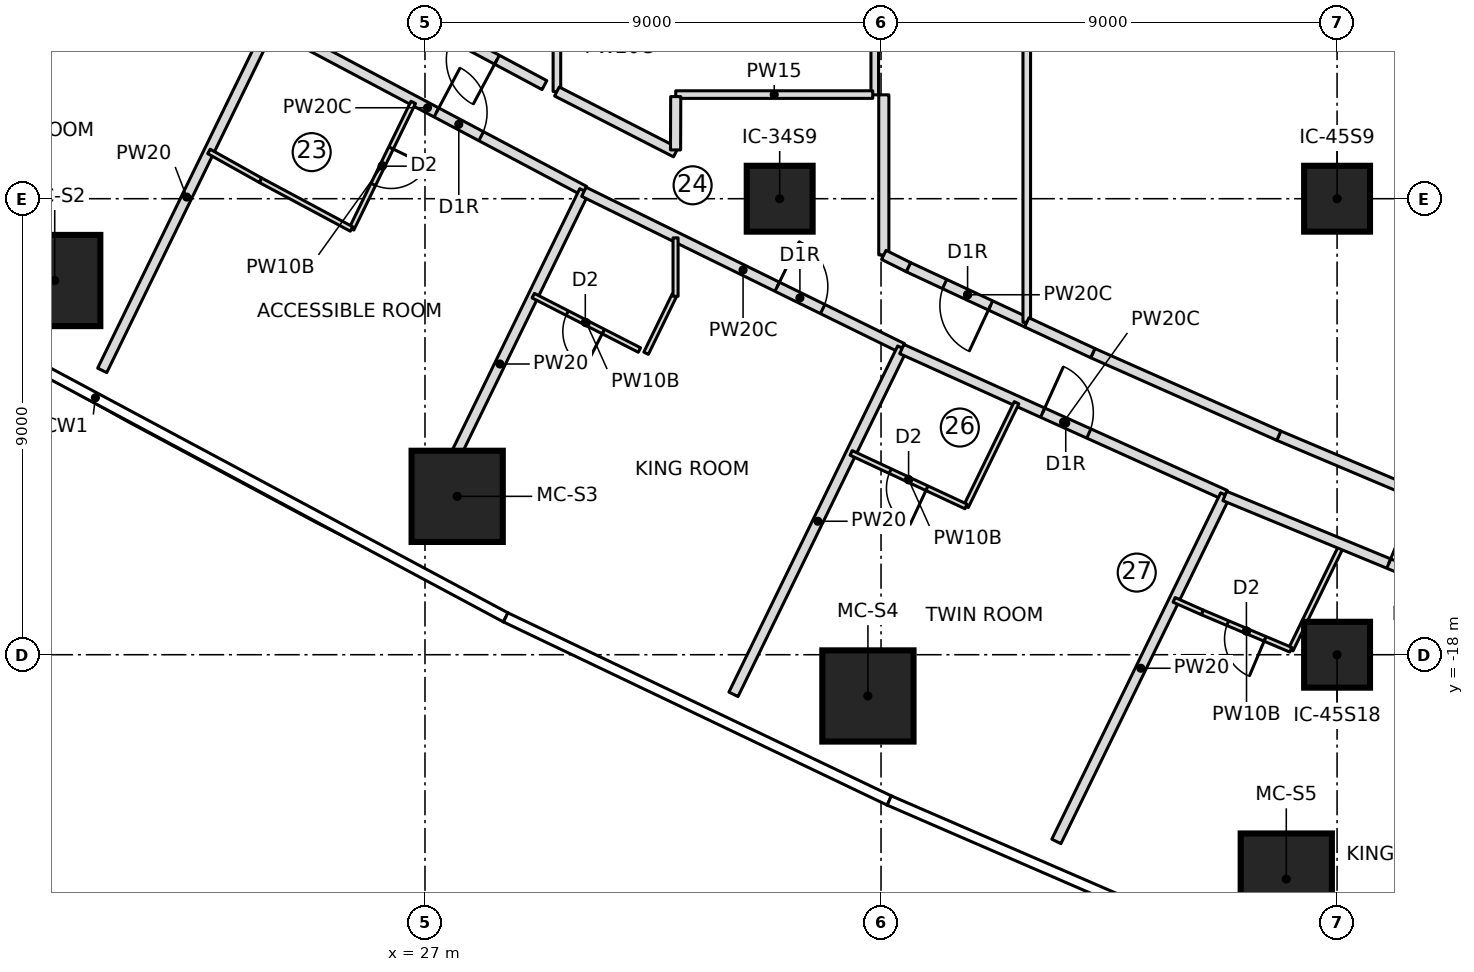
"""IFC4 building model, lengths in metres.
Left out: names, types, materials, properties, quantities, classifications, styles, units other than length and angle.
Written with IfcOpenShell. Run it as: python <this file> out.ifc"""

import sys

from ifc_helpers import new_model, si_unit, direction, frame, frame_2d, origin, origin_2d, place, context, subcontext, project, spatial, rectangle, extrude, element, fill, save


model = new_model("IFC4")
c1 = context("Model", 3, precision=1e-05, world=origin(), true_north=direction((0.0, 1.0)))
c2 = subcontext(c1, "Body", "Model", "MODEL_VIEW")
j1 = project(units=[si_unit("LENGTHUNIT", "METRE"), si_unit("PLANEANGLEUNIT", "RADIAN")], contexts=[c1])
p1 = place(None, origin())
s1 = spatial("IfcSite", under=j1, at=p1, CompositionType="ELEMENT")
p2 = place(p1, origin())
s2 = spatial("IfcBuilding", under=s1, at=p2, CompositionType="ELEMENT")
p3 = place(p2, frame((0.0, 0.0, 68.0)))
s3 = spatial("IfcBuildingStorey", under=s2, at=p3, CompositionType="ELEMENT", Elevation=68.0)
for number, where, z_axis, x_axis in (
    (1, (19.693, -10.615, 0.0), (0.0, 0.0, 1.0), (1.0, 0.0, 0.0)),
    (2, (27.635, -14.874, 0.0), (0.0, 0.0, 1.0), (1.0, 0.0, 0.0)),
    (3, (35.741, -18.814, 0.0), (0.0, 0.0, 1.0), (1.0, 0.0, 0.0)),
    (4, (43.998, -22.428, 0.0), (0.0, 0.0, 1.0), (1.0, 0.0, 0.0)),
):
    element("IfcColumn", number, at=place(p3, frame(where, z_axis=z_axis, x_axis=x_axis)), inside=s3, PredefinedType="COLUMN", context=c2, shape_type="SweptSolid", body=[
        extrude(rectangle(XDim=1.8, YDim=1.8, at=origin_2d()), origin(), (0.0, 0.0, 1.0), 3.55),
    ])
for number, where, z_axis, x_axis in (
    (5, (34.0, -9.0, 0.0), (0.0, 0.0, 1.0), (1.0, 0.0, 0.0)),
    (6, (45.0, -18.0, 0.0), (0.0, 0.0, 1.0), (1.0, 0.0, 0.0)),
    (7, (45.0, -9.0, 0.0), (0.0, 0.0, 1.0), (1.0, 0.0, 0.0)),
):
    element("IfcColumn", number, at=place(p3, frame(where, z_axis=z_axis, x_axis=x_axis)), inside=s3, PredefinedType="COLUMN", context=c2, shape_type="SweptSolid", body=[
        extrude(rectangle(XDim=1.3, YDim=1.3, at=origin_2d()), origin(), (0.0, 0.0, 1.0), 3.55),
    ])
p4 = place(p3, frame((20.63, -12.388, 0.0), z_axis=(0.0, 0.0, 1.0), x_axis=(0.438184754816, 0.898884931816, 0.0)))
e8 = element("IfcWall", 8, at=p4, inside=s3, PredefinedType="PARTITIONING", context=c2, shape_type="SweptSolid", body=[
    extrude(rectangle(XDim=7.612, YDim=0.2, at=frame_2d((3.806, 0.0))), origin(), (0.0, 0.0, 1.0), 3.25),
])
p5 = place(p3, frame((23.957, -5.564, 0.0), z_axis=(0.0, 0.0, 1.0), x_axis=(0.883455325405, -0.468515408513, 0.0)))
e9 = element("IfcWall", 9, at=p5, inside=s3, PredefinedType="PARTITIONING", context=c2, shape_type="SweptSolid", body=[
    extrude(rectangle(XDim=7.004, YDim=0.2, at=frame_2d((3.502, 0.0))), origin(), (0.0, 0.0, 1.0), 3.25),
])
p6 = place(p5, frame((3.7, 0.0, 0.0)))
e10 = element("IfcOpeningElement", 10, at=p6, cuts=e9, PredefinedType="OPENING", context=c2, shape_type="SweptSolid", body=[
    extrude(rectangle(XDim=1.0, YDim=2.1, at=frame_2d((0.5, 1.05))), frame((0.0, 0.11, 0.0), z_axis=(0.0, -1.0, 0.0), x_axis=(1.0, 0.0, 0.0)), (0.0, 0.0, 1.0), 0.22),
])
p7 = place(p3, frame((26.768, -7.1, 0.0), z_axis=(0.0, 0.0, 1.0), x_axis=(-0.43822975423, -0.898862994292, 0.0)))
e11 = element("IfcWall", 11, at=p7, inside=s3, PredefinedType="PARTITIONING", context=c2, shape_type="SweptSolid", body=[
    extrude(rectangle(XDim=2.779, YDim=0.1, at=frame_2d((1.389, 0.0))), origin(), (0.0, 0.0, 1.0), 3.25),
])
p8 = place(p7, frame((1.0, 0.0, 0.0)))
e12 = element("IfcOpeningElement", 12, at=p8, cuts=e11, PredefinedType="OPENING", context=c2, shape_type="SweptSolid", body=[
    extrude(rectangle(XDim=0.8, YDim=2.1, at=frame_2d((0.4, 1.05))), frame((0.0, 0.06, 0.0), z_axis=(0.0, -1.0, 0.0), x_axis=(1.0, 0.0, 0.0)), (0.0, 0.0, 1.0), 0.12),
])
p9 = place(p3, frame((25.55, -9.597, 0.0), z_axis=(0.0, 0.0, 1.0), x_axis=(-0.881675736231, 0.471855800156, 0.0)))
e13 = element("IfcWall", 13, at=p9, inside=s3, PredefinedType="PARTITIONING", context=c2, shape_type="SweptSolid", body=[
    extrude(rectangle(XDim=2.039, YDim=0.1, at=frame_2d((1.019, 0.0))), origin(), (0.0, 0.0, 1.0), 3.25),
])
p10 = place(p3, frame((23.753, -8.635, 0.0), z_axis=(0.0, 0.0, 1.0), x_axis=(-0.872799020153, 0.488079778745, 0.0)))
e14 = element("IfcWall", 14, at=p10, inside=s3, PredefinedType="PARTITIONING", context=c2, shape_type="SweptSolid", body=[
    extrude(rectangle(XDim=1.165, YDim=0.1, at=frame_2d((0.582, 0.0))), origin(), (0.0, 0.0, 1.0), 3.25),
])
p11 = place(p3, frame((26.813, -15.678, 0.0), z_axis=(0.0, 0.0, 1.0), x_axis=(0.438185054829, 0.898884785567, 0.0)))
e15 = element("IfcWall", 15, at=p11, inside=s3, PredefinedType="PARTITIONING", context=c2, shape_type="SweptSolid", body=[
    extrude(rectangle(XDim=7.601, YDim=0.2, at=frame_2d((3.801, 0.0))), origin(), (0.0, 0.0, 1.0), 3.25),
])
p12 = place(p3, frame((30.135, -8.864, 0.0), z_axis=(0.0, 0.0, 1.0), x_axis=(0.897599118183, -0.44081268475, 0.0)))
e16 = element("IfcWall", 16, at=p12, inside=s3, PredefinedType="PARTITIONING", context=c2, shape_type="SweptSolid", body=[
    extrude(rectangle(XDim=7.0, YDim=0.2, at=frame_2d((3.5, 0.0))), origin(), (0.0, 0.0, 1.0), 3.25),
])
p13 = place(p12, frame((4.25, 0.0, 0.0)))
e17 = element("IfcOpeningElement", 17, at=p13, cuts=e16, PredefinedType="OPENING", context=c2, shape_type="SweptSolid", body=[
    extrude(rectangle(XDim=1.0, YDim=2.1, at=frame_2d((0.5, 1.05))), frame((0.0, 0.11, 0.0), z_axis=(0.0, -1.0, 0.0), x_axis=(1.0, 0.0, 0.0)), (0.0, 0.0, 1.0), 0.22),
])
p14 = place(p3, frame((31.925, -10.898, 0.0), z_axis=(0.0, 0.0, 1.0), x_axis=(-0.438356099343, -0.898801385273, 0.0)))
e18 = element("IfcWall", 18, at=p14, inside=s3, PredefinedType="PARTITIONING", context=c2, shape_type="SweptSolid", body=[
    extrude(rectangle(XDim=1.282, YDim=0.1, at=frame_2d((0.641, 0.0))), origin(), (0.0, 0.0, 1.0), 3.25),
])
p15 = place(p3, frame((31.232, -11.986, 0.0), z_axis=(0.0, 0.0, 1.0), x_axis=(-0.890219804082, 0.45553122881, 0.0)))
e19 = element("IfcWall", 19, at=p15, inside=s3, PredefinedType="PARTITIONING", context=c2, shape_type="SweptSolid", body=[
    extrude(rectangle(XDim=2.354, YDim=0.1, at=frame_2d((1.177, 0.0))), origin(), (0.0, 0.0, 1.0), 3.25),
])
p16 = place(p15, frame((0.8, 0.0, 0.0)))
e20 = element("IfcOpeningElement", 20, at=p16, cuts=e19, PredefinedType="OPENING", context=c2, shape_type="SweptSolid", body=[
    extrude(rectangle(XDim=0.8, YDim=2.1, at=frame_2d((0.4, 1.05))), frame((0.0, 0.06, 0.0), z_axis=(0.0, -1.0, 0.0), x_axis=(1.0, 0.0, 0.0)), (0.0, 0.0, 1.0), 0.12),
])
p17 = place(p3, frame((33.088, -18.782, 0.0), z_axis=(0.0, 0.0, 1.0), x_axis=(0.438197705697, 0.898878618459, 0.0)))
e21 = element("IfcWall", 21, at=p17, inside=s3, PredefinedType="PARTITIONING", context=c2, shape_type="SweptSolid", body=[
    extrude(rectangle(XDim=7.601, YDim=0.2, at=frame_2d((3.801, 0.0))), origin(), (0.0, 0.0, 1.0), 3.25),
])
p18 = place(p3, frame((36.41, -11.968, 0.0), z_axis=(0.0, 0.0, 1.0), x_axis=(0.911422478094, -0.411471829443, 0.0)))
e22 = element("IfcWall", 22, at=p18, inside=s3, PredefinedType="PARTITIONING", context=c2, shape_type="SweptSolid", body=[
    extrude(rectangle(XDim=7.003, YDim=0.2, at=frame_2d((3.501, 0.0))), origin(), (0.0, 0.0, 1.0), 3.25),
])
p19 = place(p18, frame((3.05, 0.0, 0.0)))
e23 = element("IfcOpeningElement", 23, at=p19, cuts=e22, PredefinedType="OPENING", context=c2, shape_type="SweptSolid", body=[
    extrude(rectangle(XDim=1.0, YDim=2.1, at=frame_2d((0.5, 1.05))), frame((0.0, 0.11, 0.0), z_axis=(0.0, -1.0, 0.0), x_axis=(1.0, 0.0, 0.0)), (0.0, 0.0, 1.0), 0.22),
])
p20 = place(p3, frame((38.675, -13.027, 0.0), z_axis=(0.0, 0.0, 1.0), x_axis=(-0.43818492173, -0.89888485045, 0.0)))
e24 = element("IfcWall", 24, at=p20, inside=s3, PredefinedType="PARTITIONING", context=c2, shape_type="SweptSolid", body=[
    extrude(rectangle(XDim=2.277, YDim=0.1, at=frame_2d((1.139, 0.0))), origin(), (0.0, 0.0, 1.0), 3.25),
])
p21 = place(p3, frame((37.677, -15.074, 0.0), z_axis=(0.0, 0.0, 1.0), x_axis=(-0.906317797926, 0.422596792655, 0.0)))
e25 = element("IfcWall", 25, at=p21, inside=s3, PredefinedType="PARTITIONING", context=c2, shape_type="SweptSolid", body=[
    extrude(rectangle(XDim=2.5, YDim=0.1, at=frame_2d((1.25, 0.0))), origin(), (0.0, 0.0, 1.0), 3.25),
])
p22 = place(p21, frame((0.85, 0.0, 0.0)))
e26 = element("IfcOpeningElement", 26, at=p22, cuts=e25, PredefinedType="OPENING", context=c2, shape_type="SweptSolid", body=[
    extrude(rectangle(XDim=0.8, YDim=2.1, at=frame_2d((0.4, 1.05))), frame((0.0, 0.06, 0.0), z_axis=(0.0, -1.0, 0.0), x_axis=(1.0, 0.0, 0.0)), (0.0, 0.0, 1.0), 0.12),
])
p23 = place(p3, frame((39.46, -21.685, 0.0), z_axis=(0.0, 0.0, 1.0), x_axis=(0.438214892445, 0.898870239823, 0.0)))
e27 = element("IfcWall", 27, at=p23, inside=s3, PredefinedType="PARTITIONING", context=c2, shape_type="SweptSolid", body=[
    extrude(rectangle(XDim=7.605, YDim=0.2, at=frame_2d((3.802, 0.0))), origin(), (0.0, 0.0, 1.0), 3.25),
])
p24 = place(p3, frame((45.085, -15.852, 0.0), z_axis=(0.0, 0.0, 1.0), x_axis=(-0.438227394636, -0.89886414468, 0.0)))
e28 = element("IfcWall", 28, at=p24, inside=s3, PredefinedType="PARTITIONING", context=c2, shape_type="SweptSolid", body=[
    extrude(rectangle(XDim=1.667, YDim=0.1, at=frame_2d((0.833, 0.0))), origin(), (0.0, 0.0, 1.0), 3.25),
])
p25 = place(p3, frame((44.35, -17.36, 0.0), z_axis=(0.0, 0.0, 1.0), x_axis=(-0.438279975423, -0.898838507822, 0.0)))
e29 = element("IfcWall", 29, at=p25, inside=s3, PredefinedType="PARTITIONING", context=c2, shape_type="SweptSolid", body=[
    extrude(rectangle(XDim=0.603, YDim=0.1, at=frame_2d((0.301, 0.0))), origin(), (0.0, 0.0, 1.0), 3.25),
])
p26 = place(p3, frame((44.086, -17.902, 0.0), z_axis=(0.0, 0.0, 1.0), x_axis=(-0.921263923232, 0.38893802045, 0.0)))
e30 = element("IfcWall", 30, at=p26, inside=s3, PredefinedType="PARTITIONING", context=c2, shape_type="SweptSolid", body=[
    extrude(rectangle(XDim=1.895, YDim=0.1, at=frame_2d((0.948, 0.0))), origin(), (0.0, 0.0, 1.0), 3.25),
])
p27 = place(p26, frame((0.55, 0.0, 0.0)))
e31 = element("IfcOpeningElement", 31, at=p27, cuts=e30, PredefinedType="OPENING", context=c2, shape_type="SweptSolid", body=[
    extrude(rectangle(XDim=0.8, YDim=2.1, at=frame_2d((0.4, 1.05))), frame((0.0, 0.06, 0.0), z_axis=(0.0, -1.0, 0.0), x_axis=(1.0, 0.0, 0.0)), (0.0, 0.0, 1.0), 0.12),
])
p28 = place(p3, frame((42.34, -17.165, 0.0), z_axis=(0.0, 0.0, 1.0), x_axis=(-0.913894320415, 0.405952178357, 0.0)))
e32 = element("IfcWall", 32, at=p28, inside=s3, PredefinedType="PARTITIONING", context=c2, shape_type="SweptSolid", body=[
    extrude(rectangle(XDim=0.608, YDim=0.1, at=frame_2d((0.304, 0.0))), origin(), (0.0, 0.0, 1.0), 3.25),
])
p29 = place(p3, frame((29.357, -6.758, 0.0), z_axis=(0.0, 0.0, 1.0), x_axis=(-0.881637943627, 0.471926409895, 0.0)))
e33 = element("IfcWall", 33, at=p29, inside=s3, PredefinedType="PARTITIONING", context=c2, shape_type="SweptSolid", body=[
    extrude(rectangle(XDim=3.124, YDim=0.2, at=frame_2d((1.562, 0.0))), origin(), (0.0, 0.0, 1.0), 3.25),
])
p30 = place(p29, frame((1.062, 0.0, 0.0)))
e34 = element("IfcOpeningElement", 34, at=p30, cuts=e33, PredefinedType="OPENING", context=c2, shape_type="SweptSolid", body=[
    extrude(rectangle(XDim=1.0, YDim=2.1, at=frame_2d((0.5, 1.05))), frame((0.0, 0.11, 0.0), z_axis=(0.0, -1.0, 0.0), x_axis=(1.0, 0.0, 0.0)), (0.0, 0.0, 1.0), 0.22),
])
p31 = place(p3, frame((29.604, -6.884, 0.0), z_axis=(0.0, 0.0, 1.0), x_axis=(0.0, 1.0, 0.0)))
e35 = element("IfcWall", 35, at=p31, inside=s3, PredefinedType="PARTITIONING", context=c2, shape_type="SweptSolid", body=[
    extrude(rectangle(XDim=13.768, YDim=0.15, at=frame_2d((6.884, 0.0))), origin(), (0.0, 0.0, 1.0), 3.25),
])
p32 = place(p3, frame((31.95, -8.085, 0.0), z_axis=(0.0, 0.0, 1.0), x_axis=(-0.890220210981, 0.455530433628, 0.0)))
e36 = element("IfcWall", 36, at=p32, inside=s3, PredefinedType="PARTITIONING", context=c2, shape_type="SweptSolid", body=[
    extrude(rectangle(XDim=2.636, YDim=0.2, at=frame_2d((1.318, 0.0))), origin(), (0.0, 0.0, 1.0), 3.25),
])
p33 = place(p3, frame((35.876, -6.95, 0.0), z_axis=(0.0, 0.0, 1.0), x_axis=(0.0, 1.0, 0.0)))
e37 = element("IfcWall", 37, at=p33, inside=s3, PredefinedType="PARTITIONING", context=c2, shape_type="SweptSolid", body=[
    extrude(rectangle(XDim=13.9, YDim=0.15, at=frame_2d((6.95, 0.0))), origin(), (0.0, 0.0, 1.0), 3.25),
])
p34 = place(p3, frame((38.876, -11.44, 0.0), z_axis=(0.0, 0.0, 1.0), x_axis=(-0.906347616376, 0.422532836937, 0.0)))
e38 = element("IfcWall", 38, at=p34, inside=s3, PredefinedType="PARTITIONING", context=c2, shape_type="SweptSolid", body=[
    extrude(rectangle(XDim=2.578, YDim=0.2, at=frame_2d((1.289, 0.0))), origin(), (0.0, 0.0, 1.0), 3.25),
])
p35 = place(p34, frame((0.789, 0.0, 0.0)))
e39 = element("IfcOpeningElement", 39, at=p35, cuts=e38, PredefinedType="OPENING", context=c2, shape_type="SweptSolid", body=[
    extrude(rectangle(XDim=1.0, YDim=2.1, at=frame_2d((0.5, 1.05))), frame((0.0, 0.11, 0.0), z_axis=(0.0, -1.0, 0.0), x_axis=(1.0, 0.0, 0.0)), (0.0, 0.0, 1.0), 0.22),
])
p36 = place(p3, frame((38.876, -11.44, 0.0), z_axis=(0.0, 0.0, 1.0), x_axis=(0.0, 1.0, 0.0)))
e40 = element("IfcWall", 40, at=p36, inside=s3, PredefinedType="PARTITIONING", context=c2, shape_type="SweptSolid", body=[
    extrude(rectangle(XDim=22.88, YDim=0.15, at=frame_2d((11.44, 0.0))), origin(), (0.0, 0.0, 1.0), 3.25),
])
p37 = place(p3, frame((47.55, -15.239, 0.0), z_axis=(0.0, 0.0, 1.0), x_axis=(-0.921269894054, 0.388923877269, 0.0)))
e41 = element("IfcWall", 41, at=p37, inside=s3, PredefinedType="PARTITIONING", context=c2, shape_type="SweptSolid", body=[
    extrude(rectangle(XDim=4.016, YDim=0.2, at=frame_2d((2.008, 0.0))), origin(), (0.0, 0.0, 1.0), 3.25),
])
p38 = place(p3, frame((43.85, -13.677, 0.0), z_axis=(0.0, 0.0, 1.0), x_axis=(-0.913986953061, 0.405743576209, 0.0)))
e42 = element("IfcWall", 42, at=p38, inside=s3, PredefinedType="PARTITIONING", context=c2, shape_type="SweptSolid", body=[
    extrude(rectangle(XDim=4.016, YDim=0.2, at=frame_2d((2.008, 0.0))), origin(), (0.0, 0.0, 1.0), 3.25),
])
p39 = place(p3, frame((40.18, -12.048, 0.0), z_axis=(0.0, 0.0, 1.0), x_axis=(-0.906347874546, 0.422532283152, 0.0)))
e43 = element("IfcWall", 43, at=p39, inside=s3, PredefinedType="PARTITIONING", context=c2, shape_type="SweptSolid", body=[
    extrude(rectangle(XDim=1.438, YDim=0.2, at=frame_2d((0.719, 0.0))), origin(), (0.0, 0.0, 1.0), 3.25),
])
p40 = place(p3, frame((31.945, -9.773, 0.0), z_axis=(0.0, 0.0, 1.0), x_axis=(0.0, -1.0, 0.0)))
e44 = element("IfcWall", 44, at=p40, inside=s3, PredefinedType="PARTITIONING", context=c2, shape_type="SweptSolid", body=[
    extrude(rectangle(XDim=1.153, YDim=0.1, at=frame_2d((0.576, 0.0))), origin(), (0.0, 0.0, 1.0), 3.25),
])
p41 = place(p3, frame((42.784, -14.867, 0.0), z_axis=(0.0, 0.0, 1.0), x_axis=(0.92451459323, -0.381146647507, 0.0)))
e45 = element("IfcWall", 45, at=p41, inside=s3, PredefinedType="PARTITIONING", context=c2, shape_type="SweptSolid", body=[
    extrude(rectangle(XDim=5.322, YDim=0.2, at=frame_2d((2.661, 0.0))), origin(), (0.0, 0.0, 1.0), 3.25),
])
p42 = place(p41, frame((3.5, 0.0, 0.0)))
e46 = element("IfcOpeningElement", 46, at=p42, cuts=e45, PredefinedType="OPENING", context=c2, shape_type="SweptSolid", body=[
    extrude(rectangle(XDim=1.0, YDim=2.1, at=frame_2d((0.5, 1.05))), frame((0.0, 0.11, 0.0), z_axis=(0.0, -1.0, 0.0), x_axis=(1.0, 0.0, 0.0)), (0.0, 0.0, 1.0), 0.22),
])
p43 = place(p3, frame((35.836, -6.945, 0.0), z_axis=(0.0, 0.0, 1.0), x_axis=(-0.999999998028, -6.2798292e-05, 0.0)))
e47 = element("IfcWall", 47, at=p43, inside=s3, PredefinedType="PARTITIONING", context=c2, shape_type="SweptSolid", body=[
    extrude(rectangle(XDim=3.888, YDim=0.15, at=frame_2d((1.944, 0.0))), origin(), (0.0, 0.0, 1.0), 3.25),
])
p44 = place(p3, frame((31.948, -6.985, 0.0), z_axis=(0.0, 0.0, 1.0), x_axis=(-0.003248242724, -0.999994724446, 0.0)))
e48 = element("IfcWall", 48, at=p44, inside=s3, PredefinedType="PARTITIONING", context=c2, shape_type="SweptSolid", body=[
    extrude(rectangle(XDim=1.052, YDim=0.2, at=frame_2d((0.526, 0.0))), origin(), (0.0, 0.0, 1.0), 3.25),
])
p45 = place(p3, frame((36.055, -10.108, 0.0), z_axis=(0.0, 0.0, 1.0), x_axis=(0.0, 1.0, 0.0)))
e49 = element("IfcWall", 49, at=p45, inside=s3, PredefinedType="PARTITIONING", context=c2, shape_type="SweptSolid", body=[
    extrude(rectangle(XDim=3.158, YDim=0.2, at=frame_2d((1.579, 0.0))), origin(), (0.0, 0.0, 1.0), 3.25),
])
p46 = place(p3, frame((36.54, -10.351, 0.0), z_axis=(0.0, 0.0, 1.0), x_axis=(-0.894337154042, 0.447393624116, 0.0)))
e50 = element("IfcWall", 50, at=p46, inside=s3, PredefinedType="PARTITIONING", context=c2, shape_type="SweptSolid", body=[
    extrude(rectangle(XDim=0.542, YDim=0.2, at=frame_2d((0.271, 0.0))), origin(), (0.0, 0.0, 1.0), 3.25),
])
p47 = place(p8, origin())
e51 = element("IfcDoor", 51, at=p47, inside=s3, OperationType="SINGLE_SWING_LEFT", PredefinedType="DOOR", context=c2, shape_type="SweptSolid", body=[
    extrude(rectangle(XDim=0.8, YDim=2.1, at=frame_2d((0.4, 1.05))), frame((0.0, 0.025, 0.0), z_axis=(0.0, -1.0, 0.0), x_axis=(1.0, 0.0, 0.0)), (0.0, 0.0, 1.0), 0.05),
])
fill(e12, e51)
p48 = place(p6, origin())
e52 = element("IfcDoor", 52, at=p48, inside=s3, OperationType="SINGLE_SWING_RIGHT", PredefinedType="DOOR", context=c2, shape_type="SweptSolid", body=[
    extrude(rectangle(XDim=1.0, YDim=2.1, at=frame_2d((0.5, 1.05))), frame((0.0, 0.025, 0.0), z_axis=(0.0, -1.0, 0.0), x_axis=(1.0, 0.0, 0.0)), (0.0, 0.0, 1.0), 0.05),
])
fill(e10, e52)
p49 = place(p16, origin())
e53 = element("IfcDoor", 53, at=p49, inside=s3, OperationType="SINGLE_SWING_LEFT", PredefinedType="DOOR", context=c2, shape_type="SweptSolid", body=[
    extrude(rectangle(XDim=0.8, YDim=2.1, at=frame_2d((0.4, 1.05))), frame((0.0, 0.025, 0.0), z_axis=(0.0, -1.0, 0.0), x_axis=(1.0, 0.0, 0.0)), (0.0, 0.0, 1.0), 0.05),
])
fill(e20, e53)
p50 = place(p13, origin())
e54 = element("IfcDoor", 54, at=p50, inside=s3, OperationType="SINGLE_SWING_RIGHT", PredefinedType="DOOR", context=c2, shape_type="SweptSolid", body=[
    extrude(rectangle(XDim=1.0, YDim=2.1, at=frame_2d((0.5, 1.05))), frame((0.0, 0.025, 0.0), z_axis=(0.0, -1.0, 0.0), x_axis=(1.0, 0.0, 0.0)), (0.0, 0.0, 1.0), 0.05),
])
fill(e17, e54)
p51 = place(p22, origin())
e55 = element("IfcDoor", 55, at=p51, inside=s3, OperationType="SINGLE_SWING_LEFT", PredefinedType="DOOR", context=c2, shape_type="SweptSolid", body=[
    extrude(rectangle(XDim=0.8, YDim=2.1, at=frame_2d((0.4, 1.05))), frame((0.0, 0.025, 0.0), z_axis=(0.0, -1.0, 0.0), x_axis=(1.0, 0.0, 0.0)), (0.0, 0.0, 1.0), 0.05),
])
fill(e26, e55)
p52 = place(p19, origin())
e56 = element("IfcDoor", 56, at=p52, inside=s3, OperationType="SINGLE_SWING_RIGHT", PredefinedType="DOOR", context=c2, shape_type="SweptSolid", body=[
    extrude(rectangle(XDim=1.0, YDim=2.1, at=frame_2d((0.5, 1.05))), frame((0.0, 0.025, 0.0), z_axis=(0.0, -1.0, 0.0), x_axis=(1.0, 0.0, 0.0)), (0.0, 0.0, 1.0), 0.05),
])
fill(e23, e56)
p53 = place(p27, origin())
e57 = element("IfcDoor", 57, at=p53, inside=s3, OperationType="SINGLE_SWING_LEFT", PredefinedType="DOOR", context=c2, shape_type="SweptSolid", body=[
    extrude(rectangle(XDim=0.8, YDim=2.1, at=frame_2d((0.4, 1.05))), frame((0.0, 0.025, 0.0), z_axis=(0.0, -1.0, 0.0), x_axis=(1.0, 0.0, 0.0)), (0.0, 0.0, 1.0), 0.05),
])
fill(e31, e57)
p54 = place(p42, origin())
e58 = element("IfcDoor", 58, at=p54, inside=s3, OperationType="SINGLE_SWING_RIGHT", PredefinedType="DOOR", context=c2, shape_type="SweptSolid", body=[
    extrude(rectangle(XDim=1.0, YDim=2.1, at=frame_2d((0.5, 1.05))), frame((0.0, 0.025, 0.0), z_axis=(0.0, -1.0, 0.0), x_axis=(1.0, 0.0, 0.0)), (0.0, 0.0, 1.0), 0.05),
])
fill(e46, e58)
p55 = place(p30, origin())
e59 = element("IfcDoor", 59, at=p55, inside=s3, OperationType="SINGLE_SWING_RIGHT", PredefinedType="DOOR", context=c2, shape_type="SweptSolid", body=[
    extrude(rectangle(XDim=1.0, YDim=2.1, at=frame_2d((0.5, 1.05))), frame((0.0, 0.025, 0.0), z_axis=(0.0, -1.0, 0.0), x_axis=(1.0, 0.0, 0.0)), (0.0, 0.0, 1.0), 0.05),
])
fill(e34, e59)
p56 = place(p35, origin())
e60 = element("IfcDoor", 60, at=p56, inside=s3, OperationType="SINGLE_SWING_RIGHT", PredefinedType="DOOR", context=c2, shape_type="SweptSolid", body=[
    extrude(rectangle(XDim=1.0, YDim=2.1, at=frame_2d((0.5, 1.05))), frame((0.0, 0.025, 0.0), z_axis=(0.0, -1.0, 0.0), x_axis=(1.0, 0.0, 0.0)), (0.0, 0.0, 1.0), 0.05),
])
fill(e39, e60)
save(model, sys.argv[1])
